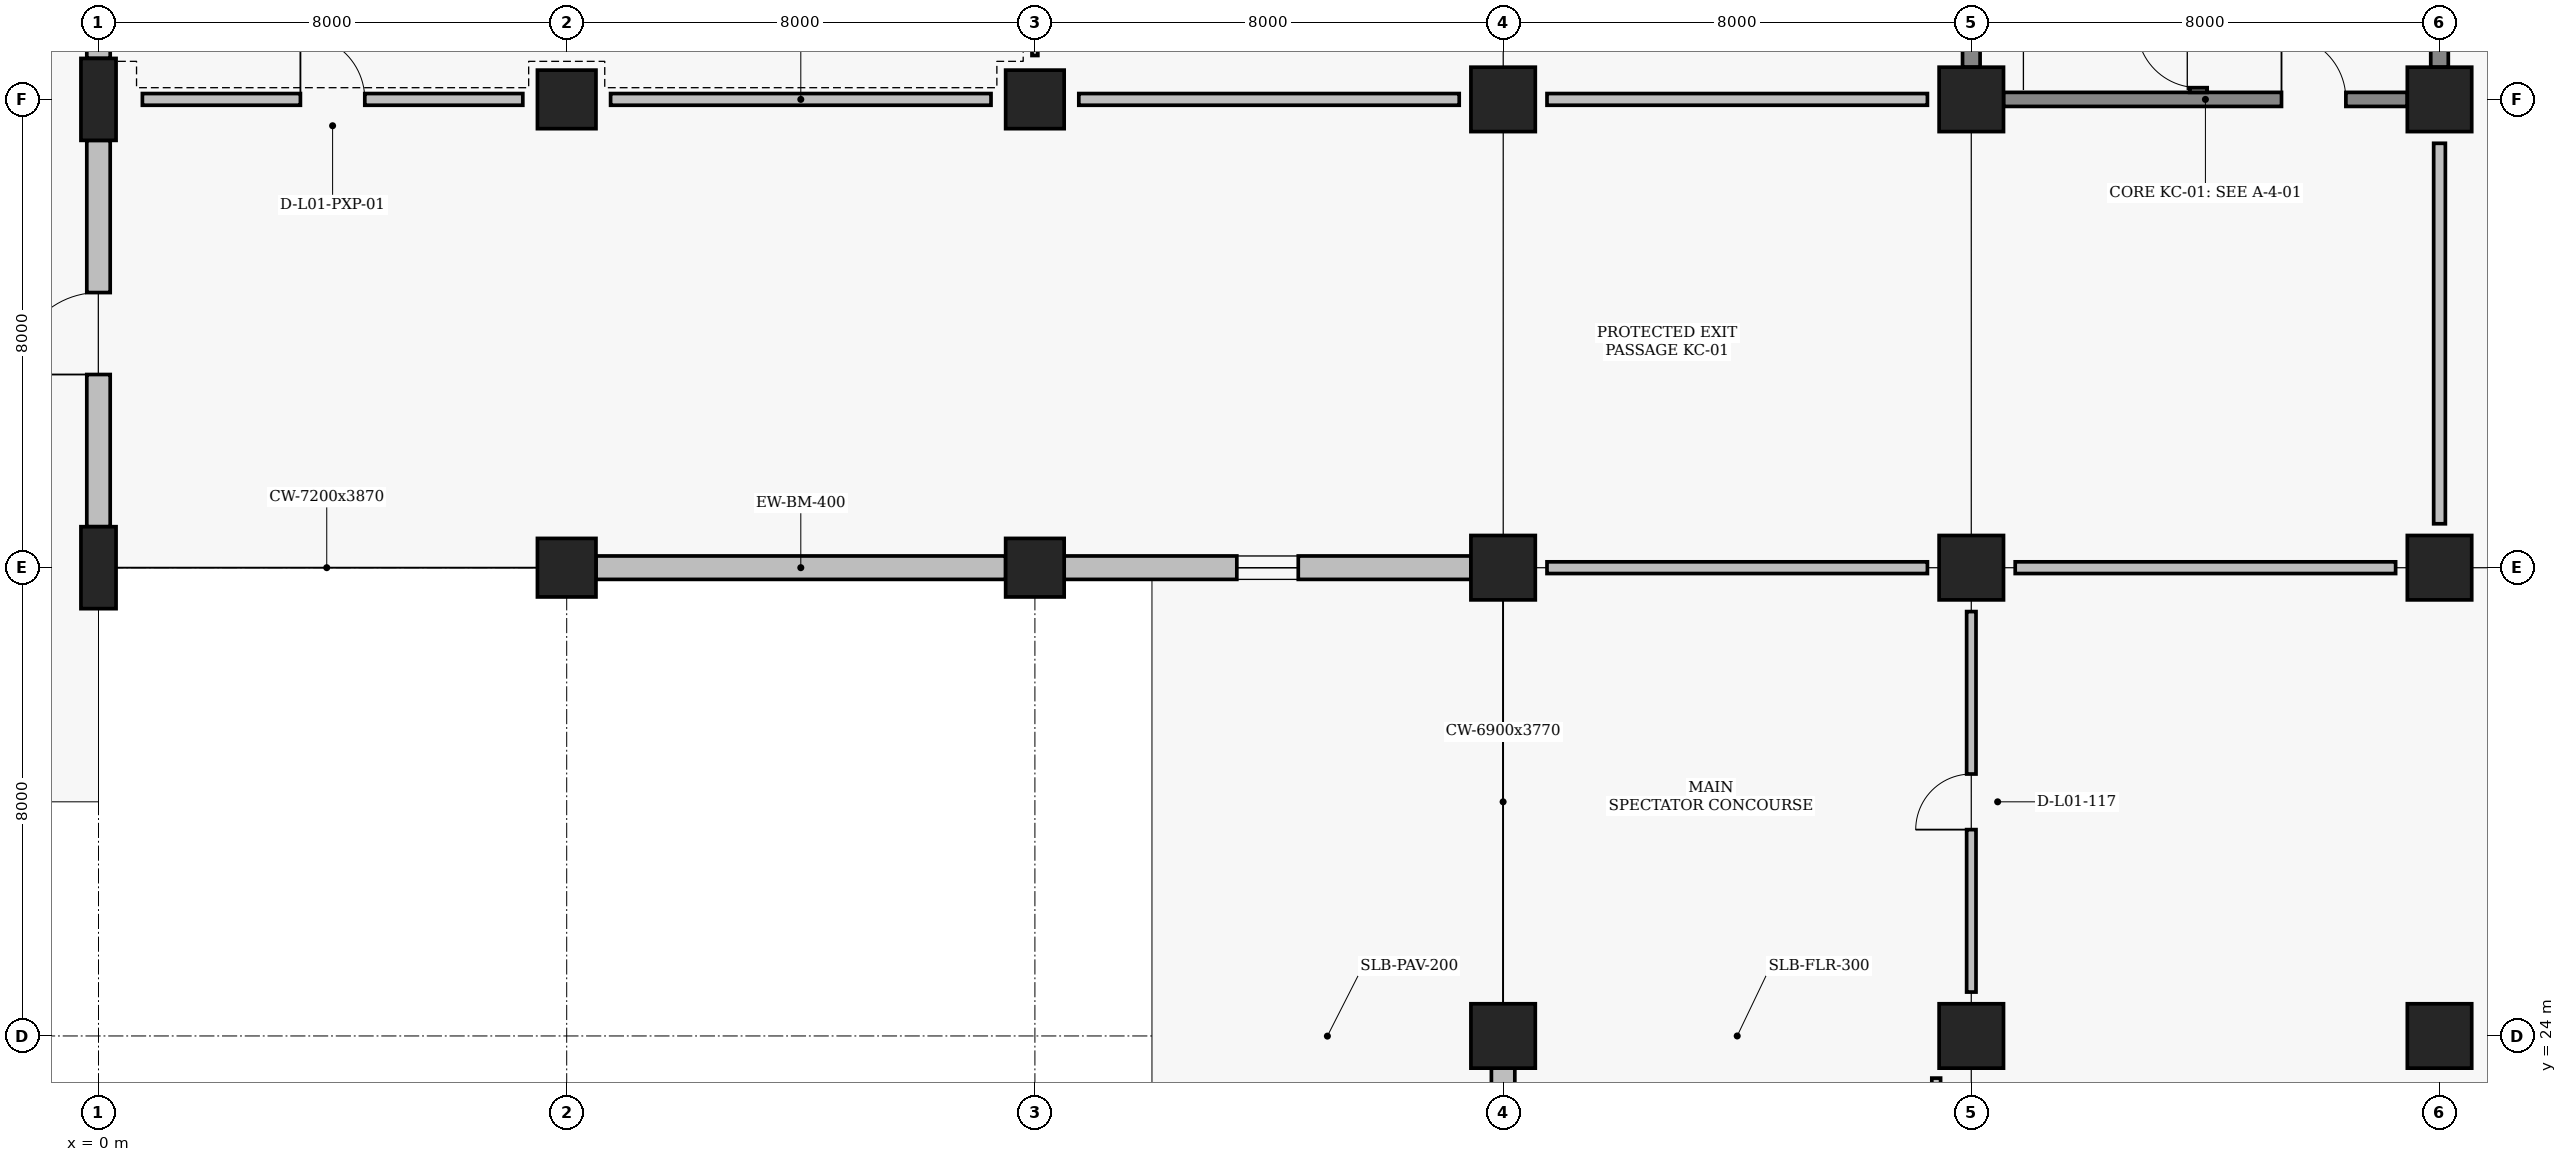
"""IFC4 building model, lengths in metres.
Left out: names, types, materials, properties, quantities, classifications, styles, units other than length and angle.
Written with IfcOpenShell. Run it as: python <this file> out.ifc"""

import sys

from ifc_helpers import new_model, si_unit, direction, frame, frame_2d, origin, origin_2d, place, context, subcontext, project, spatial, rectangle, circle, extrude, element, fill, save


model = new_model("IFC4")
c1 = context("Model", 3, precision=1e-05, world=origin(), true_north=direction((0.0, 1.0)))
c2 = subcontext(c1, "Body", "Model", "MODEL_VIEW")
j1 = project(units=[si_unit("LENGTHUNIT", "METRE"), si_unit("PLANEANGLEUNIT", "RADIAN")], contexts=[c1])
p1 = place(None, origin())
s1 = spatial("IfcSite", under=j1, at=p1, CompositionType="ELEMENT")
p2 = place(p1, origin())
s2 = spatial("IfcBuilding", under=s1, at=p2, CompositionType="ELEMENT")
p3 = place(p2, origin())
s3 = spatial("IfcBuildingStorey", under=s2, at=p3, CompositionType="ELEMENT", Elevation=0.0)
for number, where, z_axis, x_axis in (
    (1, (0.0, 32.0, 0.0), (0.0, 0.0, 1.0), (1.0, 0.0, 0.0)),
    (2, (0.0, 40.0, 0.0), (0.0, 0.0, 1.0), (1.0, 0.0, 0.0)),
):
    element("IfcColumn", number, at=place(p3, frame(where, z_axis=z_axis, x_axis=x_axis)), inside=s3, PredefinedType="PILASTER", context=c2, shape_type="SweptSolid", body=[
        extrude(rectangle(XDim=0.6, YDim=1.4, at=origin_2d()), origin(), (0.0, 0.0, 1.0), 4.8),
    ])
for number, where, z_axis, x_axis in (
    (3, (8.0, 32.0, 0.0), (0.0, 0.0, 1.0), (1.0, 0.0, 0.0)),
    (4, (8.0, 40.0, 0.0), (0.0, 0.0, 1.0), (1.0, 0.0, 0.0)),
    (5, (16.0, 32.0, 0.0), (0.0, 0.0, 1.0), (1.0, 0.0, 0.0)),
    (6, (16.0, 40.0, 0.0), (0.0, 0.0, 1.0), (1.0, 0.0, 0.0)),
):
    element("IfcColumn", number, at=place(p3, frame(where, z_axis=z_axis, x_axis=x_axis)), inside=s3, PredefinedType="COLUMN", context=c2, shape_type="SweptSolid", body=[
        extrude(circle(Radius=0.5, at=origin_2d()), origin(), (0.0, 0.0, 1.0), 4.8),
    ])
for number, where, z_axis, x_axis in (
    (7, (24.0, 24.0, 0.0), (0.0, 0.0, 1.0), (1.0, 0.0, 0.0)),
    (8, (24.0, 32.0, 0.0), (0.0, 0.0, 1.0), (1.0, 0.0, 0.0)),
    (9, (24.0, 40.0, 0.0), (0.0, 0.0, 1.0), (1.0, 0.0, 0.0)),
    (10, (32.0, 24.0, 0.0), (0.0, 0.0, 1.0), (1.0, 0.0, 0.0)),
    (11, (32.0, 32.0, 0.0), (0.0, 0.0, 1.0), (1.0, 0.0, 0.0)),
    (12, (32.0, 40.0, 0.0), (0.0, 0.0, 1.0), (1.0, 0.0, 0.0)),
    (13, (40.0, 24.0, 0.0), (0.0, 0.0, 1.0), (1.0, 0.0, 0.0)),
    (14, (40.0, 32.0, 0.0), (0.0, 0.0, 1.0), (1.0, 0.0, 0.0)),
    (15, (40.0, 40.0, 0.0), (0.0, 0.0, 1.0), (1.0, 0.0, 0.0)),
):
    element("IfcColumn", number, at=place(p3, frame(where, z_axis=z_axis, x_axis=x_axis)), inside=s3, PredefinedType="COLUMN", context=c2, shape_type="SweptSolid", body=[
        extrude(rectangle(XDim=1.1, YDim=1.1, at=origin_2d()), origin(), (0.0, 0.0, 1.0), 4.8),
    ])
p4 = place(p3, frame((0.0, 32.7, 0.0), z_axis=(0.0, 0.0, 1.0), x_axis=(0.0, 1.0, 0.0)))
e16 = element("IfcWall", 16, at=p4, inside=s3, PredefinedType="SOLIDWALL", context=c2, shape_type="SweptSolid", body=[
    extrude(rectangle(XDim=6.6, YDim=0.4, at=frame_2d((3.3, 0.0))), origin(), (0.0, 0.0, 1.0), 3.66),
])
p5 = place(p4, frame((2.6, 0.0, 0.0)))
e17 = element("IfcOpeningElement", 17, at=p5, cuts=e16, PredefinedType="OPENING", context=c2, shape_type="SweptSolid", body=[
    extrude(rectangle(XDim=1.4, YDim=2.2, at=frame_2d((0.7, 1.1))), frame((0.0, 0.21, 0.0), z_axis=(0.0, -1.0, 0.0), x_axis=(1.0, 0.0, 0.0)), (0.0, 0.0, 1.0), 0.42),
])
p6 = place(p3, frame((0.0, 40.7, 0.0), z_axis=(0.0, 0.0, 1.0), x_axis=(0.0, 1.0, 0.0)))
e18 = element("IfcWall", 18, at=p6, inside=s3, PredefinedType="SOLIDWALL", context=c2, shape_type="SweptSolid", body=[
    extrude(rectangle(XDim=6.6, YDim=0.4, at=frame_2d((3.3, 0.0))), origin(), (0.0, 0.0, 1.0), 3.66),
])
p7 = place(p6, frame((2.0, 0.0, 0.0)))
e19 = element("IfcOpeningElement", 19, at=p7, cuts=e18, PredefinedType="OPENING", context=c2, shape_type="SweptSolid", body=[
    extrude(rectangle(XDim=2.6, YDim=2.5, at=frame_2d((1.3, 1.25))), frame((0.0, 0.21, 0.0), z_axis=(0.0, -1.0, 0.0), x_axis=(1.0, 0.0, 0.0)), (0.0, 0.0, 1.0), 0.42),
])
p8 = place(p3, frame((8.5, 32.0, 0.0), z_axis=(0.0, 0.0, 1.0), x_axis=(1.0, 0.0, 0.0)))
e20 = element("IfcWall", 20, at=p8, inside=s3, PredefinedType="SOLIDWALL", context=c2, shape_type="SweptSolid", body=[
    extrude(rectangle(XDim=7.0, YDim=0.4, at=frame_2d((3.5, 0.0))), origin(), (0.0, 0.0, 1.0), 3.87),
])
p9 = place(p3, frame((16.5, 32.0, 0.0), z_axis=(0.0, 0.0, 1.0), x_axis=(1.0, 0.0, 0.0)))
e21 = element("IfcWall", 21, at=p9, inside=s3, PredefinedType="SOLIDWALL", context=c2, shape_type="SweptSolid", body=[
    extrude(rectangle(XDim=6.95, YDim=0.4, at=frame_2d((3.475, 0.0))), origin(), (0.0, 0.0, 1.0), 3.77),
])
p10 = place(p9, frame((2.95, 0.0, 0.95)))
e22 = element("IfcOpeningElement", 22, at=p10, cuts=e21, PredefinedType="OPENING", context=c2, shape_type="SweptSolid", body=[
    extrude(rectangle(XDim=1.05, YDim=1.5, at=frame_2d((0.525, 0.75))), frame((0.0, 0.21, 0.0), z_axis=(0.0, -1.0, 0.0), x_axis=(1.0, 0.0, 0.0)), (0.0, 0.0, 1.0), 0.42),
])
p11 = place(p3, frame((24.0, 16.55, 0.0), z_axis=(0.0, 0.0, 1.0), x_axis=(0.0, 1.0, 0.0)))
e23 = element("IfcWall", 23, at=p11, inside=s3, PredefinedType="SOLIDWALL", context=c2, shape_type="SweptSolid", body=[
    extrude(rectangle(XDim=6.9, YDim=0.4, at=frame_2d((3.45, 0.0))), origin(), (0.0, 0.0, 1.0), 3.72),
])
p12 = place(p3, frame((32.55, 40.0, 0.0), z_axis=(0.0, 0.0, 1.0), x_axis=(1.0, 0.0, 0.0)))
e24 = element("IfcWall", 24, at=p12, inside=s3, PredefinedType="SHEAR", context=c2, shape_type="SweptSolid", body=[
    extrude(rectangle(XDim=6.9, YDim=0.24, at=frame_2d((3.45, 0.0))), origin(), (0.0, 0.0, 1.0), 3.62),
])
p13 = place(p12, frame((4.75, 0.0, 0.0)))
e25 = element("IfcOpeningElement", 25, at=p13, cuts=e24, PredefinedType="OPENING", context=c2, shape_type="SweptSolid", body=[
    extrude(rectangle(XDim=1.1, YDim=2.2, at=frame_2d((0.55, 1.1))), frame((0.0, 0.13, 0.0), z_axis=(0.0, -1.0, 0.0), x_axis=(1.0, 0.0, 0.0)), (0.0, 0.0, 1.0), 0.26),
])
p14 = place(p3, frame((32.0, 40.55, 0.0), z_axis=(0.0, 0.0, 1.0), x_axis=(0.0, 1.0, 0.0)))
e26 = element("IfcWall", 26, at=p14, inside=s3, PredefinedType="SHEAR", context=c2, shape_type="SweptSolid", body=[
    extrude(rectangle(XDim=6.9, YDim=0.3, at=frame_2d((3.45, 0.0))), origin(), (0.0, 0.0, 1.0), 3.77),
])
p15 = place(p3, frame((40.0, 40.55, 0.0), z_axis=(0.0, 0.0, 1.0), x_axis=(0.0, 1.0, 0.0)))
e27 = element("IfcWall", 27, at=p15, inside=s3, PredefinedType="SHEAR", context=c2, shape_type="SweptSolid", body=[
    extrude(rectangle(XDim=6.9, YDim=0.3, at=frame_2d((3.45, 0.0))), origin(), (0.0, 0.0, 1.0), 3.62),
])
p16 = place(p3, frame((35.88, 40.12, 0.0), z_axis=(0.0, 0.0, 1.0), x_axis=(0.0, 1.0, 0.0)))
e28 = element("IfcWall", 28, at=p16, inside=s3, PredefinedType="SHEAR", context=c2, shape_type="SweptSolid", body=[
    extrude(rectangle(XDim=7.76, YDim=0.3, at=frame_2d((3.88, 0.0))), origin(), (0.0, 0.0, 1.0), 3.97),
])
p17 = place(p16, frame((0.08, 0.0, 0.0)))
e29 = element("IfcOpeningElement", 29, at=p17, cuts=e28, PredefinedType="OPENING", context=c2, shape_type="SweptSolid", body=[
    extrude(rectangle(XDim=1.05, YDim=2.15, at=frame_2d((0.525, 1.075))), frame((0.0, 0.16, 0.0), z_axis=(0.0, -1.0, 0.0), x_axis=(1.0, 0.0, 0.0)), (0.0, 0.0, 1.0), 0.32),
])
p18 = place(p3, frame((0.75, 40.0, 0.0), z_axis=(0.0, 0.0, 1.0), x_axis=(1.0, 0.0, 0.0)))
e30 = element("IfcWall", 30, at=p18, inside=s3, PredefinedType="PARTITIONING", context=c2, shape_type="SweptSolid", body=[
    extrude(rectangle(XDim=6.5, YDim=0.2, at=frame_2d((3.25, 0.0))), origin(), (0.0, 0.0, 1.0), 3.66),
])
p19 = place(p18, frame((2.7, 0.0, 0.0)))
e31 = element("IfcOpeningElement", 31, at=p19, cuts=e30, PredefinedType="OPENING", context=c2, shape_type="SweptSolid", body=[
    extrude(rectangle(XDim=1.1, YDim=2.2, at=frame_2d((0.55, 1.1))), frame((0.0, 0.11, 0.0), z_axis=(0.0, -1.0, 0.0), x_axis=(1.0, 0.0, 0.0)), (0.0, 0.0, 1.0), 0.22),
])
for number, where, z_axis, x_axis in (
    (32, (8.75, 40.0, 0.0), (0.0, 0.0, 1.0), (1.0, 0.0, 0.0)),
    (33, (16.75, 40.0, 0.0), (0.0, 0.0, 1.0), (1.0, 0.0, 0.0)),
):
    element("IfcWall", number, at=place(p3, frame(where, z_axis=z_axis, x_axis=x_axis)), inside=s3, PredefinedType="PARTITIONING", context=c2, shape_type="SweptSolid", body=[
        extrude(rectangle(XDim=6.5, YDim=0.2, at=frame_2d((3.25, 0.0))), origin(), (0.0, 0.0, 1.0), 3.91),
    ])
for number, where, z_axis, x_axis in (
    (34, (24.75, 32.0, 0.0), (0.0, 0.0, 1.0), (1.0, 0.0, 0.0)),
    (35, (24.75, 40.0, 0.0), (0.0, 0.0, 1.0), (1.0, 0.0, 0.0)),
):
    element("IfcWall", number, at=place(p3, frame(where, z_axis=z_axis, x_axis=x_axis)), inside=s3, PredefinedType="PARTITIONING", context=c2, shape_type="SweptSolid", body=[
        extrude(rectangle(XDim=6.5, YDim=0.2, at=frame_2d((3.25, 0.0))), origin(), (0.0, 0.0, 1.0), 3.87),
    ])
p20 = place(p3, frame((40.0, 32.75, 0.0), z_axis=(0.0, 0.0, 1.0), x_axis=(0.0, 1.0, 0.0)))
e36 = element("IfcWall", 36, at=p20, inside=s3, PredefinedType="PARTITIONING", context=c2, shape_type="SweptSolid", body=[
    extrude(rectangle(XDim=6.5, YDim=0.2, at=frame_2d((3.25, 0.0))), origin(), (0.0, 0.0, 1.0), 3.77),
])
p21 = place(p3, frame((32.75, 32.0, 0.0), z_axis=(0.0, 0.0, 1.0), x_axis=(1.0, 0.0, 0.0)))
e37 = element("IfcWall", 37, at=p21, inside=s3, PredefinedType="PARTITIONING", context=c2, shape_type="SweptSolid", body=[
    extrude(rectangle(XDim=6.5, YDim=0.2, at=frame_2d((3.25, 0.0))), origin(), (0.0, 0.0, 1.0), 3.87),
])
p22 = place(p3, frame((31.4, 16.72, 0.0), z_axis=(0.0, 0.0, 1.0), x_axis=(0.0, 1.0, 0.0)))
e38 = element("IfcWall", 38, at=p22, inside=s3, PredefinedType="PARTITIONING", context=c2, shape_type="SweptSolid", body=[
    extrude(rectangle(XDim=6.56, YDim=0.15, at=frame_2d((3.28, 0.0))), origin(), (0.0, 0.0, 1.0), 3.72),
])
p23 = place(p22, frame((1.3, 0.0, 0.0)))
e39 = element("IfcOpeningElement", 39, at=p23, cuts=e38, PredefinedType="OPENING", context=c2, shape_type="SweptSolid", body=[
    extrude(rectangle(XDim=0.9, YDim=2.1, at=frame_2d((0.45, 1.05))), frame((0.0, 0.085, 0.0), z_axis=(0.0, -1.0, 0.0), x_axis=(1.0, 0.0, 0.0)), (0.0, 0.0, 1.0), 0.17),
])
p24 = place(p22, frame((4.2, 0.0, 0.0)))
e40 = element("IfcOpeningElement", 40, at=p24, cuts=e38, PredefinedType="OPENING", context=c2, shape_type="SweptSolid", body=[
    extrude(rectangle(XDim=1.0, YDim=2.15, at=frame_2d((0.5, 1.075))), frame((0.0, 0.085, 0.0), z_axis=(0.0, -1.0, 0.0), x_axis=(1.0, 0.0, 0.0)), (0.0, 0.0, 1.0), 0.17),
])
p25 = place(p3, frame((32.0, 24.75, 0.0), z_axis=(0.0, 0.0, 1.0), x_axis=(0.0, 1.0, 0.0)))
e41 = element("IfcWall", 41, at=p25, inside=s3, PredefinedType="PARTITIONING", context=c2, shape_type="SweptSolid", body=[
    extrude(rectangle(XDim=6.5, YDim=0.16, at=frame_2d((3.25, 0.0))), origin(), (0.0, 0.0, 1.0), 3.77),
])
p26 = place(p25, frame((2.775, 0.0, 0.0)))
e42 = element("IfcOpeningElement", 42, at=p26, cuts=e41, PredefinedType="OPENING", context=c2, shape_type="SweptSolid", body=[
    extrude(rectangle(XDim=0.95, YDim=2.1, at=frame_2d((0.475, 1.05))), frame((0.0, 0.09, 0.0), z_axis=(0.0, -1.0, 0.0), x_axis=(1.0, 0.0, 0.0)), (0.0, 0.0, 1.0), 0.18),
])
p27 = place(p3, frame((16.0, 40.75, 0.0), z_axis=(0.0, 0.0, 1.0), x_axis=(0.0, 1.0, 0.0)))
e43 = element("IfcWall", 43, at=p27, inside=s3, PredefinedType="PARTITIONING", context=c2, shape_type="SweptSolid", body=[
    extrude(rectangle(XDim=6.5, YDim=0.1, at=frame_2d((3.25, 0.0))), origin(), (0.0, 0.0, 1.0), 3.81),
])
p28 = place(p27, frame((2.775, 0.0, 0.0)))
e44 = element("IfcOpeningElement", 44, at=p28, cuts=e43, PredefinedType="OPENING", context=c2, shape_type="SweptSolid", body=[
    extrude(rectangle(XDim=0.95, YDim=2.1, at=frame_2d((0.475, 1.05))), frame((0.0, 0.06, 0.0), z_axis=(0.0, -1.0, 0.0), x_axis=(1.0, 0.0, 0.0)), (0.0, 0.0, 1.0), 0.12),
])
p29 = place(p5, origin())
e45 = element("IfcDoor", 45, at=p29, inside=s3, OperationType="SINGLE_SWING_LEFT", PredefinedType="DOOR", context=c2, shape_type="SweptSolid", body=[
    extrude(rectangle(XDim=1.4, YDim=2.2, at=frame_2d((0.7, 1.1))), frame((0.0, 0.025, 0.0), z_axis=(0.0, -1.0, 0.0), x_axis=(1.0, 0.0, 0.0)), (0.0, 0.0, 1.0), 0.05),
])
fill(e17, e45)
p30 = place(p10, origin())
e46 = element("IfcWindow", 46, at=p30, inside=s3, PartitioningType="SINGLE_PANEL", PredefinedType="WINDOW", context=c2, shape_type="SweptSolid", body=[
    extrude(rectangle(XDim=1.05, YDim=1.5, at=frame_2d((0.525, 0.75))), frame((0.0, 0.03, 0.0), z_axis=(0.0, -1.0, 0.0), x_axis=(1.0, 0.0, 0.0)), (0.0, 0.0, 1.0), 0.06),
])
fill(e22, e46)
p31 = place(p13, origin())
e47 = element("IfcDoor", 47, at=p31, inside=s3, OperationType="SINGLE_SWING_LEFT", PredefinedType="DOOR", context=c2, shape_type="SweptSolid", body=[
    extrude(rectangle(XDim=1.1, YDim=2.2, at=frame_2d((0.55, 1.1))), frame((0.0, 0.025, 0.0), z_axis=(0.0, -1.0, 0.0), x_axis=(1.0, 0.0, 0.0)), (0.0, 0.0, 1.0), 0.05),
])
fill(e25, e47)
p32 = place(p17, origin())
e48 = element("IfcDoor", 48, at=p32, inside=s3, OperationType="SINGLE_SWING_RIGHT", PredefinedType="DOOR", context=c2, shape_type="SweptSolid", body=[
    extrude(rectangle(XDim=1.05, YDim=2.15, at=frame_2d((0.525, 1.075))), frame((0.0, 0.025, 0.0), z_axis=(0.0, -1.0, 0.0), x_axis=(1.0, 0.0, 0.0)), (0.0, 0.0, 1.0), 0.05),
])
fill(e29, e48)
p33 = place(p19, origin())
e49 = element("IfcDoor", 49, at=p33, inside=s3, OperationType="SINGLE_SWING_LEFT", PredefinedType="DOOR", context=c2, shape_type="SweptSolid", body=[
    extrude(rectangle(XDim=1.1, YDim=2.2, at=frame_2d((0.55, 1.1))), frame((0.0, 0.025, 0.0), z_axis=(0.0, -1.0, 0.0), x_axis=(1.0, 0.0, 0.0)), (0.0, 0.0, 1.0), 0.05),
])
fill(e31, e49)
p34 = place(p26, origin())
e50 = element("IfcDoor", 50, at=p34, inside=s3, OperationType="SINGLE_SWING_LEFT", PredefinedType="DOOR", context=c2, shape_type="SweptSolid", body=[
    extrude(rectangle(XDim=0.95, YDim=2.1, at=frame_2d((0.475, 1.05))), frame((0.0, 0.025, 0.0), z_axis=(0.0, -1.0, 0.0), x_axis=(1.0, 0.0, 0.0)), (0.0, 0.0, 1.0), 0.05),
])
fill(e42, e50)
save(model, sys.argv[1])
